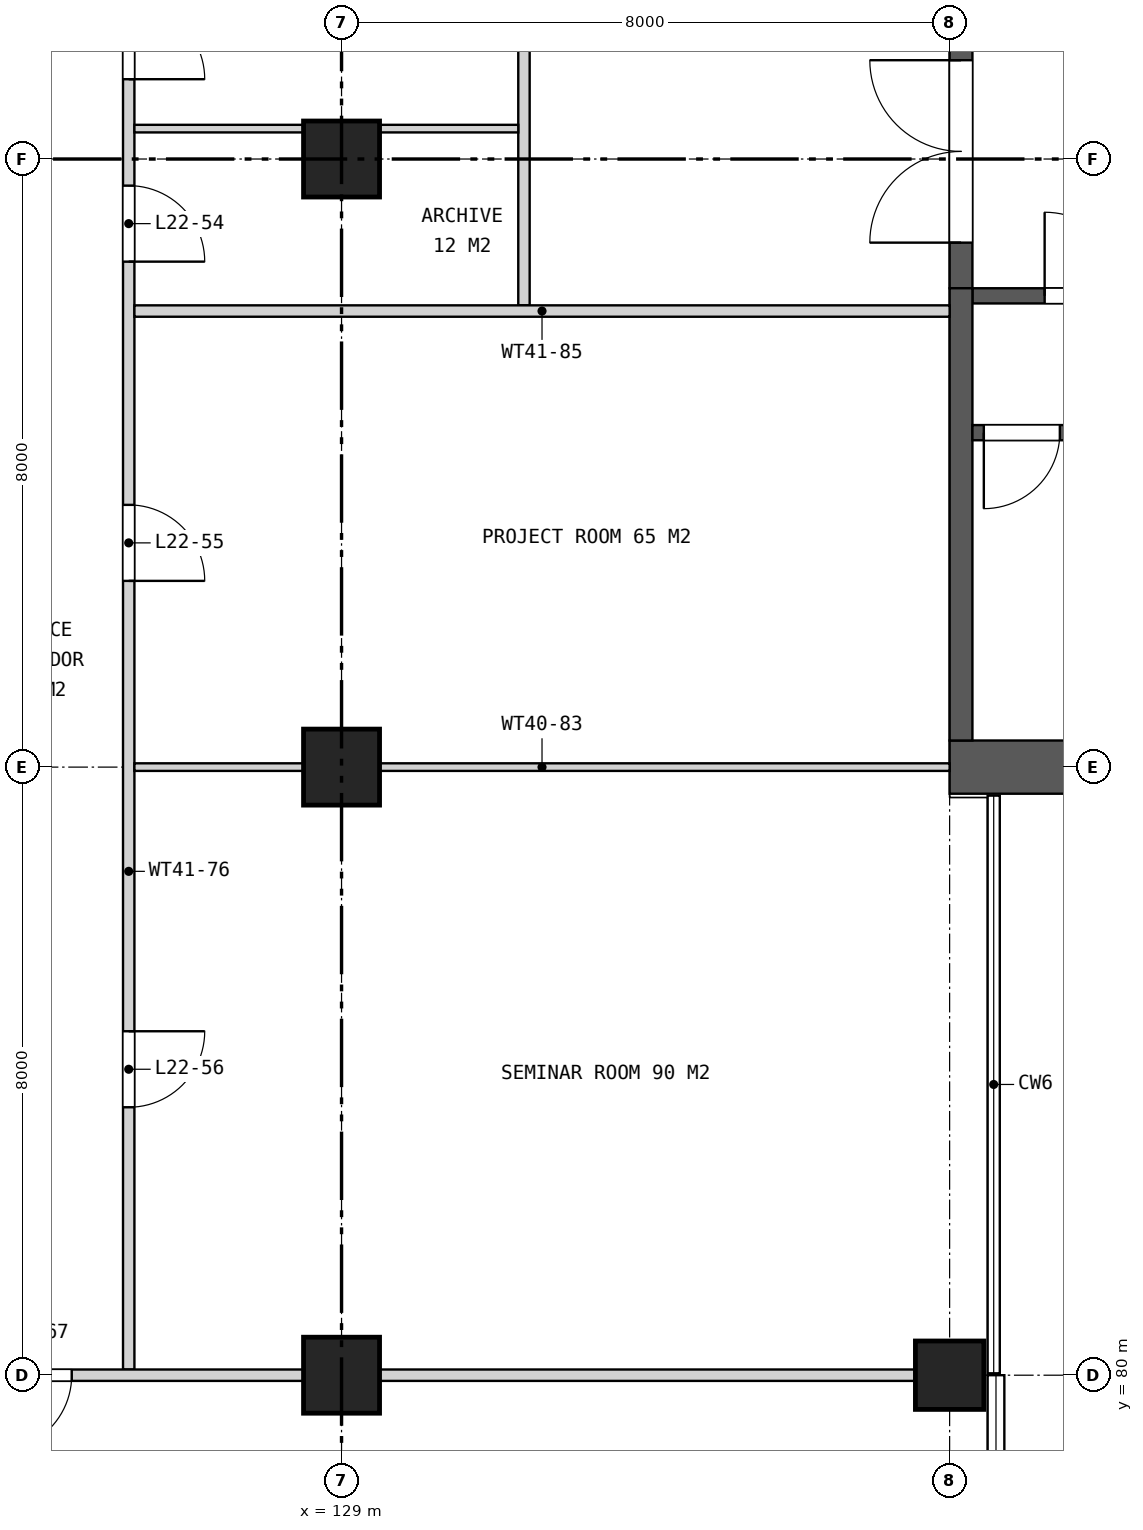
"""IFC4 building model, lengths in metres.
Left out: names, types, materials, properties, quantities, classifications, styles, units other than length and angle.
Written with IfcOpenShell. Run it as: python <this file> out.ifc"""

import sys

from ifc_helpers import new_model, si_unit, direction, frame, frame_2d, origin, origin_2d, place, context, subcontext, project, spatial, rectangle, extrude, element, fill, save


model = new_model("IFC4")
c1 = context("Model", 3, precision=1e-05, world=origin(), true_north=direction((0.0, 1.0)))
c2 = subcontext(c1, "Body", "Model", "MODEL_VIEW")
j1 = project(units=[si_unit("LENGTHUNIT", "METRE"), si_unit("PLANEANGLEUNIT", "RADIAN")], contexts=[c1])
p1 = place(None, origin())
s1 = spatial("IfcSite", under=j1, at=p1, CompositionType="ELEMENT")
p2 = place(p1, origin())
s2 = spatial("IfcBuilding", under=s1, at=p2, CompositionType="ELEMENT")
p3 = place(p2, frame((0.0, 0.0, 112.7)))
s3 = spatial("IfcBuildingStorey", under=s2, at=p3, CompositionType="ELEMENT", Elevation=112.7)
for number, where, z_axis, x_axis in (
    (1, (129.0, 80.0, 0.0), (0.0, 0.0, 1.0), (1.0, 0.0, 0.0)),
    (2, (129.0, 88.0, 0.0), (0.0, 0.0, 1.0), (1.0, 0.0, 0.0)),
    (3, (129.0, 96.0, 0.0), (0.0, 0.0, 1.0), (1.0, 0.0, 0.0)),
):
    element("IfcColumn", number, at=place(p3, frame(where, z_axis=z_axis, x_axis=x_axis)), inside=s3, PredefinedType="COLUMN", context=c2, shape_type="SweptSolid", body=[
        extrude(rectangle(XDim=1.0, YDim=1.0, at=origin_2d()), origin(), (0.0, 0.0, 1.0), 4.2),
    ])
p4 = place(p3, frame((137.0, 80.0, 0.0), z_axis=(0.0, 0.0, 1.0), x_axis=(1.0, 0.0, 0.0)))
e4 = element("IfcColumn", 4, at=p4, inside=s3, PredefinedType="COLUMN", context=c2, shape_type="SweptSolid", body=[
    extrude(rectangle(XDim=0.9, YDim=0.9, at=origin_2d()), origin(), (0.0, 0.0, 1.0), 4.2),
])
p5 = place(p3, frame((137.0, 88.0, 0.0), z_axis=(0.0, 0.0, 1.0), x_axis=(1.0, 0.0, 0.0)))
e5 = element("IfcWall", 5, at=p5, inside=s3, PredefinedType="SHEAR", context=c2, shape_type="SweptSolid", body=[
    extrude(rectangle(XDim=7.1, YDim=0.7, at=frame_2d((3.55, 0.0))), origin(), (0.0, 0.0, 1.0), 4.2),
])
p6 = place(p3, frame((137.15, 94.3, 0.0), z_axis=(0.0, 0.0, 1.0), x_axis=(0.0, 1.0, 0.0)))
e6 = element("IfcWall", 6, at=p6, inside=s3, PredefinedType="SHEAR", context=c2, shape_type="SweptSolid", body=[
    extrude(rectangle(XDim=11.4, YDim=0.3, at=frame_2d((5.7, 0.0))), origin(), (0.0, 0.0, 1.0), 4.2),
])
p7 = place(p6, frame((0.6, 0.0, 0.0)))
e7 = element("IfcOpeningElement", 7, at=p7, cuts=e6, PredefinedType="OPENING", context=c2, shape_type="SweptSolid", body=[
    extrude(rectangle(XDim=2.4, YDim=2.4, at=frame_2d((1.2, 1.2))), frame((0.0, 0.16, 0.0), z_axis=(0.0, -1.0, 0.0), x_axis=(1.0, 0.0, 0.0)), (0.0, 0.0, 1.0), 0.32),
])
p8 = place(p6, frame((4.5, 0.0, 0.0)))
e8 = element("IfcOpeningElement", 8, at=p8, cuts=e6, PredefinedType="OPENING", context=c2, shape_type="SweptSolid", body=[
    extrude(rectangle(XDim=2.4, YDim=2.4, at=frame_2d((1.2, 1.2))), frame((0.0, 0.16, 0.0), z_axis=(0.0, -1.0, 0.0), x_axis=(1.0, 0.0, 0.0)), (0.0, 0.0, 1.0), 0.32),
])
p9 = place(p6, frame((8.4, 0.0, 0.0)))
e9 = element("IfcOpeningElement", 9, at=p9, cuts=e6, PredefinedType="OPENING", context=c2, shape_type="SweptSolid", body=[
    extrude(rectangle(XDim=2.4, YDim=2.4, at=frame_2d((1.2, 1.2))), frame((0.0, 0.16, 0.0), z_axis=(0.0, -1.0, 0.0), x_axis=(1.0, 0.0, 0.0)), (0.0, 0.0, 1.0), 0.32),
])
p10 = place(p3, frame((137.3, 94.2, 0.0), z_axis=(0.0, 0.0, 1.0), x_axis=(1.0, 0.0, 0.0)))
e10 = element("IfcWall", 10, at=p10, inside=s3, PredefinedType="SHEAR", context=c2, shape_type="SweptSolid", body=[
    extrude(rectangle(XDim=15.35, YDim=0.2, at=frame_2d((7.675, 0.0))), origin(), (0.0, 0.0, 1.0), 4.2),
])
p11 = place(p10, frame((0.95, 0.0, 0.0)))
e11 = element("IfcOpeningElement", 11, at=p11, cuts=e10, PredefinedType="OPENING", context=c2, shape_type="SweptSolid", body=[
    extrude(rectangle(XDim=1.1, YDim=2.1, at=frame_2d((0.55, 1.05))), frame((0.0, 0.11, 0.0), z_axis=(0.0, -1.0, 0.0), x_axis=(1.0, 0.0, 0.0)), (0.0, 0.0, 1.0), 0.22),
])
p12 = place(p3, frame((137.15, 88.35, 0.0), z_axis=(0.0, 0.0, 1.0), x_axis=(0.0, 1.0, 0.0)))
e12 = element("IfcWall", 12, at=p12, inside=s3, PredefinedType="SHEAR", context=c2, shape_type="SweptSolid", body=[
    extrude(rectangle(XDim=5.95, YDim=0.3, at=frame_2d((2.975, 0.0))), origin(), (0.0, 0.0, 1.0), 4.2),
])
p13 = place(p3, frame((137.3, 92.4, 0.0), z_axis=(0.0, 0.0, 1.0), x_axis=(1.0, 0.0, 0.0)))
e13 = element("IfcWall", 13, at=p13, inside=s3, PredefinedType="SHEAR", context=c2, shape_type="SweptSolid", body=[
    extrude(rectangle(XDim=6.8, YDim=0.2, at=frame_2d((3.4, 0.0))), origin(), (0.0, 0.0, 1.0), 4.2),
])
p14 = place(p13, frame((0.15, 0.0, 0.0)))
e14 = element("IfcOpeningElement", 14, at=p14, cuts=e13, PredefinedType="OPENING", context=c2, shape_type="SweptSolid", body=[
    extrude(rectangle(XDim=1.0, YDim=2.1, at=frame_2d((0.5, 1.05))), frame((0.0, 0.11, 0.0), z_axis=(0.0, -1.0, 0.0), x_axis=(1.0, 0.0, 0.0)), (0.0, 0.0, 1.0), 0.22),
])
p15 = place(p3, frame((126.2, 80.075, 0.0), z_axis=(0.0, 0.0, 1.0), x_axis=(0.0, 1.0, 0.0)))
e15 = element("IfcWall", 15, at=p15, inside=s3, PredefinedType="PARTITIONING", context=c2, shape_type="SweptSolid", body=[
    extrude(rectangle(XDim=18.725, YDim=0.15, at=frame_2d((9.363, 0.0))), origin(), (0.0, 0.0, 1.0), 3.437),
])
p16 = place(p15, frame((16.975, 0.0, 0.0)))
e16 = element("IfcOpeningElement", 16, at=p16, cuts=e15, PredefinedType="OPENING", context=c2, shape_type="SweptSolid", body=[
    extrude(rectangle(XDim=1.0, YDim=2.1, at=frame_2d((0.5, 1.05))), frame((0.0, 0.085, 0.0), z_axis=(0.0, -1.0, 0.0), x_axis=(1.0, 0.0, 0.0)), (0.0, 0.0, 1.0), 0.17),
])
p17 = place(p15, frame((14.575, 0.0, 0.0)))
e17 = element("IfcOpeningElement", 17, at=p17, cuts=e15, PredefinedType="OPENING", context=c2, shape_type="SweptSolid", body=[
    extrude(rectangle(XDim=1.0, YDim=2.1, at=frame_2d((0.5, 1.05))), frame((0.0, 0.085, 0.0), z_axis=(0.0, -1.0, 0.0), x_axis=(1.0, 0.0, 0.0)), (0.0, 0.0, 1.0), 0.17),
])
p18 = place(p15, frame((10.375, 0.0, 0.0)))
e18 = element("IfcOpeningElement", 18, at=p18, cuts=e15, PredefinedType="OPENING", context=c2, shape_type="SweptSolid", body=[
    extrude(rectangle(XDim=1.0, YDim=2.1, at=frame_2d((0.5, 1.05))), frame((0.0, 0.085, 0.0), z_axis=(0.0, -1.0, 0.0), x_axis=(1.0, 0.0, 0.0)), (0.0, 0.0, 1.0), 0.17),
])
p19 = place(p15, frame((3.45, 0.0, 0.0)))
e19 = element("IfcOpeningElement", 19, at=p19, cuts=e15, PredefinedType="OPENING", context=c2, shape_type="SweptSolid", body=[
    extrude(rectangle(XDim=1.0, YDim=2.1, at=frame_2d((0.5, 1.05))), frame((0.0, 0.085, 0.0), z_axis=(0.0, -1.0, 0.0), x_axis=(1.0, 0.0, 0.0)), (0.0, 0.0, 1.0), 0.17),
])
p20 = place(p3, frame((131.4, 94.075, 0.0), z_axis=(0.0, 0.0, 1.0), x_axis=(0.0, 1.0, 0.0)))
e20 = element("IfcWall", 20, at=p20, inside=s3, PredefinedType="PARTITIONING", context=c2, shape_type="SweptSolid", body=[
    extrude(rectangle(XDim=4.725, YDim=0.15, at=frame_2d((2.363, 0.0))), origin(), (0.0, 0.0, 1.0), 3.437),
])
p21 = place(p3, frame((112.58, 80.0, 0.0), z_axis=(0.0, 0.0, 1.0), x_axis=(1.0, 0.0, 0.0)))
e21 = element("IfcWall", 21, at=p21, inside=s3, PredefinedType="PARTITIONING", context=c2, shape_type="SweptSolid", body=[
    extrude(rectangle(XDim=24.84, YDim=0.15, at=frame_2d((12.42, 0.0))), origin(), (0.0, 0.0, 1.0), 3.437),
])
p22 = place(p21, frame((11.87, 0.0, 0.0)))
e22 = element("IfcOpeningElement", 22, at=p22, cuts=e21, PredefinedType="OPENING", context=c2, shape_type="SweptSolid", body=[
    extrude(rectangle(XDim=1.0, YDim=2.1, at=frame_2d((0.5, 1.05))), frame((0.0, 0.085, 0.0), z_axis=(0.0, -1.0, 0.0), x_axis=(1.0, 0.0, 0.0)), (0.0, 0.0, 1.0), 0.17),
])
p23 = place(p3, frame((126.275, 88.0, 0.0), z_axis=(0.0, 0.0, 1.0), x_axis=(1.0, 0.0, 0.0)))
e23 = element("IfcWall", 23, at=p23, inside=s3, PredefinedType="PARTITIONING", context=c2, shape_type="SweptSolid", body=[
    extrude(rectangle(XDim=10.725, YDim=0.1, at=frame_2d((5.363, 0.0))), origin(), (0.0, 0.0, 1.0), 3.437),
])
p24 = place(p3, frame((126.275, 94.0, 0.0), z_axis=(0.0, 0.0, 1.0), x_axis=(1.0, 0.0, 0.0)))
e24 = element("IfcWall", 24, at=p24, inside=s3, PredefinedType="PARTITIONING", context=c2, shape_type="SweptSolid", body=[
    extrude(rectangle(XDim=10.725, YDim=0.15, at=frame_2d((5.363, 0.0))), origin(), (0.0, 0.0, 1.0), 3.437),
])
p25 = place(p3, frame((126.275, 96.4, 0.0), z_axis=(0.0, 0.0, 1.0), x_axis=(1.0, 0.0, 0.0)))
e25 = element("IfcWall", 25, at=p25, inside=s3, PredefinedType="PARTITIONING", context=c2, shape_type="SweptSolid", body=[
    extrude(rectangle(XDim=5.05, YDim=0.1, at=frame_2d((2.525, 0.0))), origin(), (0.0, 0.0, 1.0), 3.437),
])
p26 = place(p7, origin())
e26 = element("IfcDoor", 26, at=p26, inside=s3, OperationType="DOUBLE_DOOR_SINGLE_SWING", PredefinedType="DOOR", context=c2, shape_type="SweptSolid", body=[
    extrude(rectangle(XDim=2.4, YDim=2.4, at=frame_2d((1.2, 1.2))), frame((0.0, 0.025, 0.0), z_axis=(0.0, -1.0, 0.0), x_axis=(1.0, 0.0, 0.0)), (0.0, 0.0, 1.0), 0.05),
])
fill(e7, e26)
p27 = place(p11, origin())
e27 = element("IfcDoor", 27, at=p27, inside=s3, OperationType="SINGLE_SWING_LEFT", PredefinedType="DOOR", context=c2, shape_type="SweptSolid", body=[
    extrude(rectangle(XDim=1.1, YDim=2.1, at=frame_2d((0.55, 1.05))), frame((0.0, 0.025, 0.0), z_axis=(0.0, -1.0, 0.0), x_axis=(1.0, 0.0, 0.0)), (0.0, 0.0, 1.0), 0.05),
])
fill(e11, e27)
p28 = place(p14, frame((1.0, 0.0, 0.0), z_axis=(0.0, 0.0, 1.0), x_axis=(-1.0, 0.0, 0.0)))
e28 = element("IfcDoor", 28, at=p28, inside=s3, OperationType="SINGLE_SWING_RIGHT", PredefinedType="DOOR", context=c2, shape_type="SweptSolid", body=[
    extrude(rectangle(XDim=1.0, YDim=2.1, at=frame_2d((0.5, 1.05))), frame((0.0, 0.025, 0.0), z_axis=(0.0, -1.0, 0.0), x_axis=(1.0, 0.0, 0.0)), (0.0, 0.0, 1.0), 0.05),
])
fill(e14, e28)
p29 = place(p16, frame((1.0, 0.0, 0.0), z_axis=(0.0, 0.0, 1.0), x_axis=(-1.0, 0.0, 0.0)))
e29 = element("IfcDoor", 29, at=p29, inside=s3, OperationType="SINGLE_SWING_RIGHT", PredefinedType="DOOR", context=c2, shape_type="SweptSolid", body=[
    extrude(rectangle(XDim=1.0, YDim=2.1, at=frame_2d((0.5, 1.05))), frame((0.0, 0.025, 0.0), z_axis=(0.0, -1.0, 0.0), x_axis=(1.0, 0.0, 0.0)), (0.0, 0.0, 1.0), 0.05),
])
fill(e16, e29)
p30 = place(p17, frame((1.0, 0.0, 0.0), z_axis=(0.0, 0.0, 1.0), x_axis=(-1.0, 0.0, 0.0)))
e30 = element("IfcDoor", 30, at=p30, inside=s3, OperationType="SINGLE_SWING_RIGHT", PredefinedType="DOOR", context=c2, shape_type="SweptSolid", body=[
    extrude(rectangle(XDim=1.0, YDim=2.1, at=frame_2d((0.5, 1.05))), frame((0.0, 0.025, 0.0), z_axis=(0.0, -1.0, 0.0), x_axis=(1.0, 0.0, 0.0)), (0.0, 0.0, 1.0), 0.05),
])
fill(e17, e30)
p31 = place(p18, frame((1.0, 0.0, 0.0), z_axis=(0.0, 0.0, 1.0), x_axis=(-1.0, 0.0, 0.0)))
e31 = element("IfcDoor", 31, at=p31, inside=s3, OperationType="SINGLE_SWING_RIGHT", PredefinedType="DOOR", context=c2, shape_type="SweptSolid", body=[
    extrude(rectangle(XDim=1.0, YDim=2.1, at=frame_2d((0.5, 1.05))), frame((0.0, 0.025, 0.0), z_axis=(0.0, -1.0, 0.0), x_axis=(1.0, 0.0, 0.0)), (0.0, 0.0, 1.0), 0.05),
])
fill(e18, e31)
p32 = place(p19, frame((1.0, 0.0, 0.0), z_axis=(0.0, 0.0, 1.0), x_axis=(-1.0, 0.0, 0.0)))
e32 = element("IfcDoor", 32, at=p32, inside=s3, OperationType="SINGLE_SWING_LEFT", PredefinedType="DOOR", context=c2, shape_type="SweptSolid", body=[
    extrude(rectangle(XDim=1.0, YDim=2.1, at=frame_2d((0.5, 1.05))), frame((0.0, 0.025, 0.0), z_axis=(0.0, -1.0, 0.0), x_axis=(1.0, 0.0, 0.0)), (0.0, 0.0, 1.0), 0.05),
])
fill(e19, e32)
p33 = place(p22, frame((1.0, 0.0, 0.0), z_axis=(0.0, 0.0, 1.0), x_axis=(-1.0, 0.0, 0.0)))
e33 = element("IfcDoor", 33, at=p33, inside=s3, OperationType="SINGLE_SWING_RIGHT", PredefinedType="DOOR", context=c2, shape_type="SweptSolid", body=[
    extrude(rectangle(XDim=1.0, YDim=2.1, at=frame_2d((0.5, 1.05))), frame((0.0, 0.025, 0.0), z_axis=(0.0, -1.0, 0.0), x_axis=(1.0, 0.0, 0.0)), (0.0, 0.0, 1.0), 0.05),
])
fill(e22, e33)
save(model, sys.argv[1])
